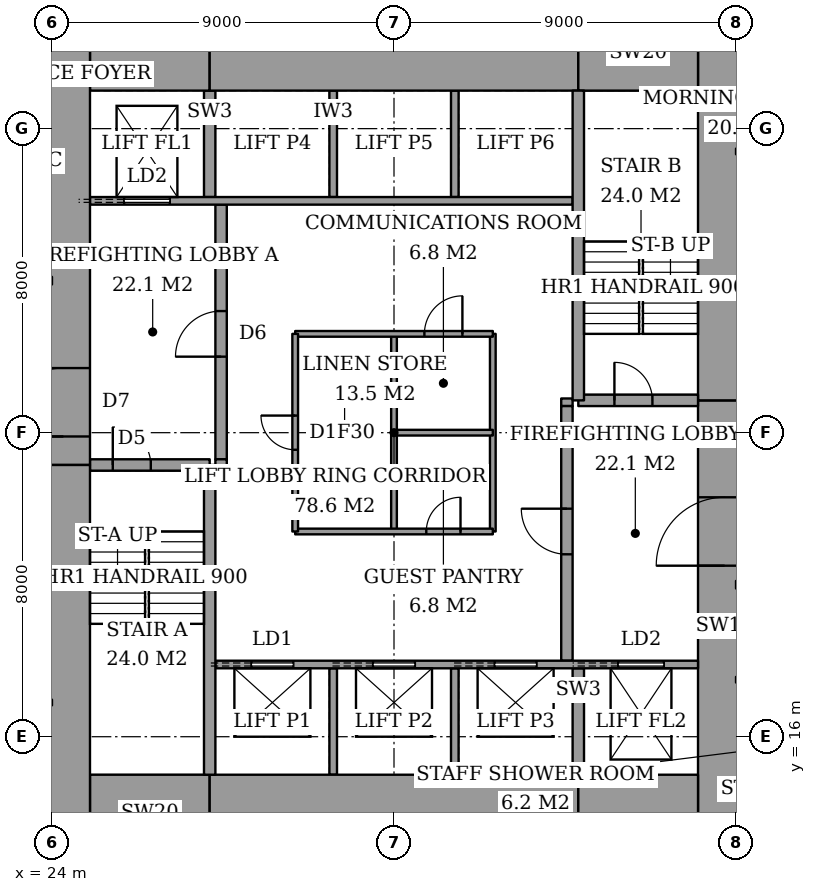
"""IFC4 building model, lengths in metres.
Left out: names, types, materials, properties, quantities, classifications, styles, units other than length and angle.
Written with IfcOpenShell. Run it as: python <this file> out.ifc"""

import sys

from ifc_helpers import new_model, si_unit, direction, frame, frame_2d, origin, place, context, subcontext, project, spatial, rectangle, extrude, element, fill, save


model = new_model("IFC4")
c1 = context("Model", 3, precision=1e-05, world=origin(), true_north=direction((0.0, 1.0)))
c2 = subcontext(c1, "Body", "Model", "MODEL_VIEW")
j1 = project(units=[si_unit("LENGTHUNIT", "METRE"), si_unit("PLANEANGLEUNIT", "RADIAN")], contexts=[c1])
p1 = place(None, origin())
s1 = spatial("IfcSite", under=j1, at=p1, CompositionType="ELEMENT")
p2 = place(p1, origin())
s2 = spatial("IfcBuilding", under=s1, at=p2, CompositionType="ELEMENT")
p3 = place(p2, frame((0.0, 0.0, 161.0)))
s3 = spatial("IfcBuildingStorey", under=s2, at=p3, CompositionType="ELEMENT", Elevation=161.0)
p4 = place(p3, frame((25.0, 14.0, 0.0), z_axis=(0.0, 0.0, 1.0), x_axis=(1.0, 0.0, 0.0)))
e1 = element("IfcWall", 1, at=p4, inside=s3, PredefinedType="SHEAR", context=c2, shape_type="SweptSolid", body=[
    extrude(rectangle(XDim=3.15, YDim=2.0, at=frame_2d((1.575, 0.0))), origin(), (0.0, 0.0, 1.0), 3.6),
])
p5 = place(p3, frame((28.15, 14.0, 0.0), z_axis=(0.0, 0.0, 1.0), x_axis=(1.0, 0.0, 0.0)))
e2 = element("IfcWall", 2, at=p5, inside=s3, PredefinedType="SHEAR", context=c2, shape_type="SweptSolid", body=[
    extrude(rectangle(XDim=9.7, YDim=2.0, at=frame_2d((4.85, 0.0))), origin(), (0.0, 0.0, 1.0), 3.6),
])
for number, where, z_axis, x_axis in (
    (3, (37.85, 14.0, 0.0), (0.0, 0.0, 1.0), (1.0, 0.0, 0.0)),
    (4, (25.0, 34.0, 0.0), (0.0, 0.0, 1.0), (1.0, 0.0, 0.0)),
):
    element("IfcWall", number, at=place(p3, frame(where, z_axis=z_axis, x_axis=x_axis)), inside=s3, PredefinedType="SHEAR", context=c2, shape_type="SweptSolid", body=[
        extrude(rectangle(XDim=3.15, YDim=2.0, at=frame_2d((1.575, 0.0))), origin(), (0.0, 0.0, 1.0), 3.6),
    ])
p6 = place(p3, frame((28.15, 34.0, 0.0), z_axis=(0.0, 0.0, 1.0), x_axis=(1.0, 0.0, 0.0)))
e5 = element("IfcWall", 5, at=p6, inside=s3, PredefinedType="SHEAR", context=c2, shape_type="SweptSolid", body=[
    extrude(rectangle(XDim=9.7, YDim=2.0, at=frame_2d((4.85, 0.0))), origin(), (0.0, 0.0, 1.0), 3.6),
])
p7 = place(p3, frame((37.85, 34.0, 0.0), z_axis=(0.0, 0.0, 1.0), x_axis=(1.0, 0.0, 0.0)))
e6 = element("IfcWall", 6, at=p7, inside=s3, PredefinedType="SHEAR", context=c2, shape_type="SweptSolid", body=[
    extrude(rectangle(XDim=3.15, YDim=2.0, at=frame_2d((1.575, 0.0))), origin(), (0.0, 0.0, 1.0), 3.6),
])
p8 = place(p3, frame((24.3, 13.0, 0.0), z_axis=(0.0, 0.0, 1.0), x_axis=(0.0, 1.0, 0.0)))
e7 = element("IfcWall", 7, at=p8, inside=s3, PredefinedType="SHEAR", context=c2, shape_type="SweptSolid", body=[
    extrude(rectangle(XDim=10.15, YDim=1.4, at=frame_2d((5.075, 0.0))), origin(), (0.0, 0.0, 1.0), 3.6),
])
p9 = place(p3, frame((24.3, 23.15, 0.0), z_axis=(0.0, 0.0, 1.0), x_axis=(0.0, 1.0, 0.0)))
e8 = element("IfcWall", 8, at=p9, inside=s3, PredefinedType="SHEAR", context=c2, shape_type="SweptSolid", body=[
    extrude(rectangle(XDim=11.85, YDim=1.4, at=frame_2d((5.925, 0.0))), origin(), (0.0, 0.0, 1.0), 3.6),
])
p10 = place(p9, frame((0.75, 0.0, 0.0)))
e9 = element("IfcOpeningElement", 9, at=p10, cuts=e8, PredefinedType="OPENING", context=c2, shape_type="SweptSolid", body=[
    extrude(rectangle(XDim=1.8, YDim=2.4, at=frame_2d((0.9, 1.2))), frame((0.0, 0.71, 0.0), z_axis=(0.0, -1.0, 0.0), x_axis=(1.0, 0.0, 0.0)), (0.0, 0.0, 1.0), 1.42),
])
p11 = place(p3, frame((41.7, 13.0, 0.0), z_axis=(0.0, 0.0, 1.0), x_axis=(0.0, 1.0, 0.0)))
e10 = element("IfcWall", 10, at=p11, inside=s3, PredefinedType="SHEAR", context=c2, shape_type="SweptSolid", body=[
    extrude(rectangle(XDim=11.85, YDim=1.4, at=frame_2d((5.925, 0.0))), origin(), (0.0, 0.0, 1.0), 3.6),
])
p12 = place(p11, frame((7.5, 0.0, 0.0)))
e11 = element("IfcOpeningElement", 11, at=p12, cuts=e10, PredefinedType="OPENING", context=c2, shape_type="SweptSolid", body=[
    extrude(rectangle(XDim=1.8, YDim=2.4, at=frame_2d((0.9, 1.2))), frame((0.0, 0.71, 0.0), z_axis=(0.0, -1.0, 0.0), x_axis=(1.0, 0.0, 0.0)), (0.0, 0.0, 1.0), 1.42),
])
p13 = place(p3, frame((41.7, 24.85, 0.0), z_axis=(0.0, 0.0, 1.0), x_axis=(0.0, 1.0, 0.0)))
e12 = element("IfcWall", 12, at=p13, inside=s3, PredefinedType="SHEAR", context=c2, shape_type="SweptSolid", body=[
    extrude(rectangle(XDim=10.15, YDim=1.4, at=frame_2d((5.075, 0.0))), origin(), (0.0, 0.0, 1.0), 3.6),
])
p14 = place(p3, frame((28.15, 15.0, 0.0), z_axis=(0.0, 0.0, 1.0), x_axis=(0.0, 1.0, 0.0)))
e13 = element("IfcWall", 13, at=p14, inside=s3, PredefinedType="SHEAR", context=c2, shape_type="SweptSolid", body=[
    extrude(rectangle(XDim=8.15, YDim=0.3, at=frame_2d((4.075, 0.0))), origin(), (0.0, 0.0, 1.0), 3.6),
])
p15 = place(p3, frame((25.0, 23.15, 0.0), z_axis=(0.0, 0.0, 1.0), x_axis=(1.0, 0.0, 0.0)))
e14 = element("IfcWall", 14, at=p15, inside=s3, PredefinedType="SHEAR", context=c2, shape_type="SweptSolid", body=[
    extrude(rectangle(XDim=3.15, YDim=0.3, at=frame_2d((1.575, 0.0))), origin(), (0.0, 0.0, 1.0), 3.6),
])
p16 = place(p15, frame((0.6, 0.0, 0.0)))
e15 = element("IfcOpeningElement", 15, at=p16, cuts=e14, PredefinedType="OPENING", context=c2, shape_type="SweptSolid", body=[
    extrude(rectangle(XDim=1.0, YDim=2.1, at=frame_2d((0.5, 1.05))), frame((0.0, 0.16, 0.0), z_axis=(0.0, -1.0, 0.0), x_axis=(1.0, 0.0, 0.0)), (0.0, 0.0, 1.0), 0.32),
])
p17 = place(p3, frame((37.85, 24.85, 0.0), z_axis=(0.0, 0.0, 1.0), x_axis=(0.0, 1.0, 0.0)))
e16 = element("IfcWall", 16, at=p17, inside=s3, PredefinedType="SHEAR", context=c2, shape_type="SweptSolid", body=[
    extrude(rectangle(XDim=8.15, YDim=0.3, at=frame_2d((4.075, 0.0))), origin(), (0.0, 0.0, 1.0), 3.6),
])
p18 = place(p3, frame((37.85, 24.85, 0.0), z_axis=(0.0, 0.0, 1.0), x_axis=(1.0, 0.0, 0.0)))
e17 = element("IfcWall", 17, at=p18, inside=s3, PredefinedType="SHEAR", context=c2, shape_type="SweptSolid", body=[
    extrude(rectangle(XDim=3.15, YDim=0.3, at=frame_2d((1.575, 0.0))), origin(), (0.0, 0.0, 1.0), 3.6),
])
p19 = place(p18, frame((0.95, 0.0, 0.0)))
e18 = element("IfcOpeningElement", 18, at=p19, cuts=e17, PredefinedType="OPENING", context=c2, shape_type="SweptSolid", body=[
    extrude(rectangle(XDim=1.0, YDim=2.1, at=frame_2d((0.5, 1.05))), frame((0.0, 0.16, 0.0), z_axis=(0.0, -1.0, 0.0), x_axis=(1.0, 0.0, 0.0)), (0.0, 0.0, 1.0), 0.32),
])
p20 = place(p3, frame((28.45, 23.3, 0.0), z_axis=(0.0, 0.0, 1.0), x_axis=(0.0, 1.0, 0.0)))
e19 = element("IfcWall", 19, at=p20, inside=s3, PredefinedType="PARTITIONING", context=c2, shape_type="SweptSolid", body=[
    extrude(rectangle(XDim=6.7, YDim=0.3, at=frame_2d((3.35, 0.0))), origin(), (0.0, 0.0, 1.0), 3.6),
])
p21 = place(p20, frame((2.7, 0.0, 0.0)))
e20 = element("IfcOpeningElement", 20, at=p21, cuts=e19, PredefinedType="OPENING", context=c2, shape_type="SweptSolid", body=[
    extrude(rectangle(XDim=1.2, YDim=2.1, at=frame_2d((0.6, 1.05))), frame((0.0, 0.16, 0.0), z_axis=(0.0, -1.0, 0.0), x_axis=(1.0, 0.0, 0.0)), (0.0, 0.0, 1.0), 0.32),
])
p22 = place(p3, frame((37.55, 18.0, 0.0), z_axis=(0.0, 0.0, 1.0), x_axis=(0.0, 1.0, 0.0)))
e21 = element("IfcWall", 21, at=p22, inside=s3, PredefinedType="PARTITIONING", context=c2, shape_type="SweptSolid", body=[
    extrude(rectangle(XDim=6.7, YDim=0.3, at=frame_2d((3.35, 0.0))), origin(), (0.0, 0.0, 1.0), 3.6),
])
p23 = place(p22, frame((2.8, 0.0, 0.0)))
e22 = element("IfcOpeningElement", 22, at=p23, cuts=e21, PredefinedType="OPENING", context=c2, shape_type="SweptSolid", body=[
    extrude(rectangle(XDim=1.2, YDim=2.1, at=frame_2d((0.6, 1.05))), frame((0.0, 0.16, 0.0), z_axis=(0.0, -1.0, 0.0), x_axis=(1.0, 0.0, 0.0)), (0.0, 0.0, 1.0), 0.32),
])
p24 = place(p3, frame((28.3, 17.9, 0.0), z_axis=(0.0, 0.0, 1.0), x_axis=(1.0, 0.0, 0.0)))
e23 = element("IfcWall", 23, at=p24, inside=s3, PredefinedType="PARTITIONING", context=c2, shape_type="SweptSolid", body=[
    extrude(rectangle(XDim=12.7, YDim=0.2, at=frame_2d((6.35, 0.0))), origin(), (0.0, 0.0, 1.0), 3.6),
])
p25 = place(p24, frame((0.95, 0.0, 0.0)))
e24 = element("IfcOpeningElement", 24, at=p25, cuts=e23, PredefinedType="OPENING", context=c2, shape_type="SweptSolid", body=[
    extrude(rectangle(XDim=1.1, YDim=2.1, at=frame_2d((0.55, 1.05))), frame((0.0, 0.11, 0.0), z_axis=(0.0, -1.0, 0.0), x_axis=(1.0, 0.0, 0.0)), (0.0, 0.0, 1.0), 0.22),
])
p26 = place(p24, frame((4.15, 0.0, 0.0)))
e25 = element("IfcOpeningElement", 25, at=p26, cuts=e23, PredefinedType="OPENING", context=c2, shape_type="SweptSolid", body=[
    extrude(rectangle(XDim=1.1, YDim=2.1, at=frame_2d((0.55, 1.05))), frame((0.0, 0.11, 0.0), z_axis=(0.0, -1.0, 0.0), x_axis=(1.0, 0.0, 0.0)), (0.0, 0.0, 1.0), 0.22),
])
p27 = place(p24, frame((7.35, 0.0, 0.0)))
e26 = element("IfcOpeningElement", 26, at=p27, cuts=e23, PredefinedType="OPENING", context=c2, shape_type="SweptSolid", body=[
    extrude(rectangle(XDim=1.1, YDim=2.1, at=frame_2d((0.55, 1.05))), frame((0.0, 0.11, 0.0), z_axis=(0.0, -1.0, 0.0), x_axis=(1.0, 0.0, 0.0)), (0.0, 0.0, 1.0), 0.22),
])
p28 = place(p24, frame((10.6, 0.0, 0.0)))
e27 = element("IfcOpeningElement", 27, at=p28, cuts=e23, PredefinedType="OPENING", context=c2, shape_type="SweptSolid", body=[
    extrude(rectangle(XDim=1.2, YDim=2.1, at=frame_2d((0.6, 1.05))), frame((0.0, 0.11, 0.0), z_axis=(0.0, -1.0, 0.0), x_axis=(1.0, 0.0, 0.0)), (0.0, 0.0, 1.0), 0.22),
])
p29 = place(p3, frame((25.0, 30.1, 0.0), z_axis=(0.0, 0.0, 1.0), x_axis=(1.0, 0.0, 0.0)))
e28 = element("IfcWall", 28, at=p29, inside=s3, PredefinedType="PARTITIONING", context=c2, shape_type="SweptSolid", body=[
    extrude(rectangle(XDim=12.7, YDim=0.2, at=frame_2d((6.35, 0.0))), origin(), (0.0, 0.0, 1.0), 3.6),
])
p30 = place(p29, frame((0.9, 0.0, 0.0)))
e29 = element("IfcOpeningElement", 29, at=p30, cuts=e28, PredefinedType="OPENING", context=c2, shape_type="SweptSolid", body=[
    extrude(rectangle(XDim=1.2, YDim=2.1, at=frame_2d((0.6, 1.05))), frame((0.0, 0.11, 0.0), z_axis=(0.0, -1.0, 0.0), x_axis=(1.0, 0.0, 0.0)), (0.0, 0.0, 1.0), 0.22),
])
for number, where, z_axis, x_axis in (
    (30, (31.4, 15.0, 0.0), (0.0, 0.0, 1.0), (0.0, 1.0, 0.0)),
    (31, (34.6, 15.0, 0.0), (0.0, 0.0, 1.0), (0.0, 1.0, 0.0)),
):
    element("IfcWall", number, at=place(p3, frame(where, z_axis=z_axis, x_axis=x_axis)), inside=s3, PredefinedType="PARTITIONING", context=c2, shape_type="SweptSolid", body=[
        extrude(rectangle(XDim=2.8, YDim=0.2, at=frame_2d((1.4, 0.0))), origin(), (0.0, 0.0, 1.0), 3.6),
    ])
p31 = place(p3, frame((37.85, 15.0, 0.0), z_axis=(0.0, 0.0, 1.0), x_axis=(0.0, 1.0, 0.0)))
e32 = element("IfcWall", 32, at=p31, inside=s3, PredefinedType="SHEAR", context=c2, shape_type="SweptSolid", body=[
    extrude(rectangle(XDim=2.8, YDim=0.3, at=frame_2d((1.4, 0.0))), origin(), (0.0, 0.0, 1.0), 3.6),
])
for number, where, z_axis, x_axis in (
    (33, (31.4, 30.2, 0.0), (0.0, 0.0, 1.0), (0.0, 1.0, 0.0)),
    (34, (34.6, 30.2, 0.0), (0.0, 0.0, 1.0), (0.0, 1.0, 0.0)),
):
    element("IfcWall", number, at=place(p3, frame(where, z_axis=z_axis, x_axis=x_axis)), inside=s3, PredefinedType="PARTITIONING", context=c2, shape_type="SweptSolid", body=[
        extrude(rectangle(XDim=2.8, YDim=0.2, at=frame_2d((1.4, 0.0))), origin(), (0.0, 0.0, 1.0), 3.6),
    ])
p32 = place(p3, frame((28.15, 30.2, 0.0), z_axis=(0.0, 0.0, 1.0), x_axis=(0.0, 1.0, 0.0)))
e35 = element("IfcWall", 35, at=p32, inside=s3, PredefinedType="SHEAR", context=c2, shape_type="SweptSolid", body=[
    extrude(rectangle(XDim=2.8, YDim=0.3, at=frame_2d((1.4, 0.0))), origin(), (0.0, 0.0, 1.0), 3.6),
])
for number, where, z_axis, x_axis in (
    (36, (28.3, 23.2, 0.0), (0.0, 0.0, 1.0), (1.0, 0.0, 0.0)),
    (37, (37.4, 24.8, 0.0), (0.0, 0.0, 1.0), (1.0, 0.0, 0.0)),
):
    element("IfcWall", number, at=place(p3, frame(where, z_axis=z_axis, x_axis=x_axis)), inside=s3, PredefinedType="PARTITIONING", context=c2, shape_type="SweptSolid", body=[
        extrude(rectangle(XDim=0.3, YDim=0.2, at=frame_2d((0.15, 0.0))), origin(), (0.0, 0.0, 1.0), 3.6),
    ])
p33 = place(p3, frame((30.4, 21.4, 0.0), z_axis=(0.0, 0.0, 1.0), x_axis=(1.0, 0.0, 0.0)))
e38 = element("IfcWall", 38, at=p33, inside=s3, PredefinedType="PARTITIONING", context=c2, shape_type="SweptSolid", body=[
    extrude(rectangle(XDim=5.2, YDim=0.15, at=frame_2d((2.6, 0.0))), origin(), (0.0, 0.0, 1.0), 3.35),
])
p34 = place(p33, frame((3.45, 0.0, 0.0)))
e39 = element("IfcOpeningElement", 39, at=p34, cuts=e38, PredefinedType="OPENING", context=c2, shape_type="SweptSolid", body=[
    extrude(rectangle(XDim=0.9, YDim=2.1, at=frame_2d((0.45, 1.05))), frame((0.0, 0.085, 0.0), z_axis=(0.0, -1.0, 0.0), x_axis=(1.0, 0.0, 0.0)), (0.0, 0.0, 1.0), 0.17),
])
p35 = place(p3, frame((30.4, 26.6, 0.0), z_axis=(0.0, 0.0, 1.0), x_axis=(1.0, 0.0, 0.0)))
e40 = element("IfcWall", 40, at=p35, inside=s3, PredefinedType="PARTITIONING", context=c2, shape_type="SweptSolid", body=[
    extrude(rectangle(XDim=5.2, YDim=0.15, at=frame_2d((2.6, 0.0))), origin(), (0.0, 0.0, 1.0), 3.35),
])
p36 = place(p35, frame((3.4, 0.0, 0.0)))
e41 = element("IfcOpeningElement", 41, at=p36, cuts=e40, PredefinedType="OPENING", context=c2, shape_type="SweptSolid", body=[
    extrude(rectangle(XDim=1.0, YDim=2.1, at=frame_2d((0.5, 1.05))), frame((0.0, 0.085, 0.0), z_axis=(0.0, -1.0, 0.0), x_axis=(1.0, 0.0, 0.0)), (0.0, 0.0, 1.0), 0.17),
])
p37 = place(p3, frame((30.4, 21.4, 0.0), z_axis=(0.0, 0.0, 1.0), x_axis=(0.0, 1.0, 0.0)))
e42 = element("IfcWall", 42, at=p37, inside=s3, PredefinedType="PARTITIONING", context=c2, shape_type="SweptSolid", body=[
    extrude(rectangle(XDim=5.2, YDim=0.15, at=frame_2d((2.6, 0.0))), origin(), (0.0, 0.0, 1.0), 3.35),
])
p38 = place(p37, frame((2.15, 0.0, 0.0)))
e43 = element("IfcOpeningElement", 43, at=p38, cuts=e42, PredefinedType="OPENING", context=c2, shape_type="SweptSolid", body=[
    extrude(rectangle(XDim=0.9, YDim=2.1, at=frame_2d((0.45, 1.05))), frame((0.0, 0.085, 0.0), z_axis=(0.0, -1.0, 0.0), x_axis=(1.0, 0.0, 0.0)), (0.0, 0.0, 1.0), 0.17),
])
p39 = place(p3, frame((35.6, 21.4, 0.0), z_axis=(0.0, 0.0, 1.0), x_axis=(0.0, 1.0, 0.0)))
e44 = element("IfcWall", 44, at=p39, inside=s3, PredefinedType="PARTITIONING", context=c2, shape_type="SweptSolid", body=[
    extrude(rectangle(XDim=5.2, YDim=0.15, at=frame_2d((2.6, 0.0))), origin(), (0.0, 0.0, 1.0), 3.35),
])
p40 = place(p3, frame((33.0, 24.0, 0.0), z_axis=(0.0, 0.0, 1.0), x_axis=(1.0, 0.0, 0.0)))
e45 = element("IfcWall", 45, at=p40, inside=s3, PredefinedType="PARTITIONING", context=c2, shape_type="SweptSolid", body=[
    extrude(rectangle(XDim=2.6, YDim=0.15, at=frame_2d((1.3, 0.0))), origin(), (0.0, 0.0, 1.0), 3.35),
])
p41 = place(p3, frame((33.0, 21.4, 0.0), z_axis=(0.0, 0.0, 1.0), x_axis=(0.0, 1.0, 0.0)))
e46 = element("IfcWall", 46, at=p41, inside=s3, PredefinedType="PARTITIONING", context=c2, shape_type="SweptSolid", body=[
    extrude(rectangle(XDim=5.2, YDim=0.15, at=frame_2d((2.6, 0.0))), origin(), (0.0, 0.0, 1.0), 3.35),
])
p42 = place(p16, origin())
e47 = element("IfcDoor", 47, at=p42, inside=s3, OperationType="SINGLE_SWING_RIGHT", PredefinedType="DOOR", context=c2, shape_type="SweptSolid", body=[
    extrude(rectangle(XDim=1.0, YDim=2.1, at=frame_2d((0.5, 1.05))), frame((0.0, 0.025, 0.0), z_axis=(0.0, -1.0, 0.0), x_axis=(1.0, 0.0, 0.0)), (0.0, 0.0, 1.0), 0.05),
])
fill(e15, e47)
p43 = place(p19, origin())
e48 = element("IfcDoor", 48, at=p43, inside=s3, OperationType="SINGLE_SWING_RIGHT", PredefinedType="DOOR", context=c2, shape_type="SweptSolid", body=[
    extrude(rectangle(XDim=1.0, YDim=2.1, at=frame_2d((0.5, 1.05))), frame((0.0, 0.025, 0.0), z_axis=(0.0, -1.0, 0.0), x_axis=(1.0, 0.0, 0.0)), (0.0, 0.0, 1.0), 0.05),
])
fill(e18, e48)
p44 = place(p21, origin())
e49 = element("IfcDoor", 49, at=p44, inside=s3, OperationType="SINGLE_SWING_RIGHT", PredefinedType="DOOR", context=c2, shape_type="SweptSolid", body=[
    extrude(rectangle(XDim=1.2, YDim=2.1, at=frame_2d((0.6, 1.05))), frame((0.0, 0.025, 0.0), z_axis=(0.0, -1.0, 0.0), x_axis=(1.0, 0.0, 0.0)), (0.0, 0.0, 1.0), 0.05),
])
fill(e20, e49)
p45 = place(p23, origin())
e50 = element("IfcDoor", 50, at=p45, inside=s3, OperationType="SINGLE_SWING_LEFT", PredefinedType="DOOR", context=c2, shape_type="SweptSolid", body=[
    extrude(rectangle(XDim=1.2, YDim=2.1, at=frame_2d((0.6, 1.05))), frame((0.0, 0.025, 0.0), z_axis=(0.0, -1.0, 0.0), x_axis=(1.0, 0.0, 0.0)), (0.0, 0.0, 1.0), 0.05),
])
fill(e22, e50)
p46 = place(p10, origin())
e51 = element("IfcDoor", 51, at=p46, inside=s3, OperationType="DOUBLE_DOOR_DOUBLE_SWING", PredefinedType="DOOR", context=c2, shape_type="SweptSolid", body=[
    extrude(rectangle(XDim=1.8, YDim=2.4, at=frame_2d((0.9, 1.2))), frame((0.0, 0.025, 0.0), z_axis=(0.0, -1.0, 0.0), x_axis=(1.0, 0.0, 0.0)), (0.0, 0.0, 1.0), 0.05),
])
fill(e9, e51)
p47 = place(p12, origin())
e52 = element("IfcDoor", 52, at=p47, inside=s3, OperationType="DOUBLE_DOOR_DOUBLE_SWING", PredefinedType="DOOR", context=c2, shape_type="SweptSolid", body=[
    extrude(rectangle(XDim=1.8, YDim=2.4, at=frame_2d((0.9, 1.2))), frame((0.0, 0.025, 0.0), z_axis=(0.0, -1.0, 0.0), x_axis=(1.0, 0.0, 0.0)), (0.0, 0.0, 1.0), 0.05),
])
fill(e11, e52)
p48 = place(p38, origin())
e53 = element("IfcDoor", 53, at=p48, inside=s3, OperationType="SINGLE_SWING_LEFT", PredefinedType="DOOR", context=c2, shape_type="SweptSolid", body=[
    extrude(rectangle(XDim=0.9, YDim=2.1, at=frame_2d((0.45, 1.05))), frame((0.0, 0.025, 0.0), z_axis=(0.0, -1.0, 0.0), x_axis=(1.0, 0.0, 0.0)), (0.0, 0.0, 1.0), 0.05),
])
fill(e43, e53)
p49 = place(p34, origin())
e54 = element("IfcDoor", 54, at=p49, inside=s3, OperationType="SINGLE_SWING_LEFT", PredefinedType="DOOR", context=c2, shape_type="SweptSolid", body=[
    extrude(rectangle(XDim=0.9, YDim=2.1, at=frame_2d((0.45, 1.05))), frame((0.0, 0.025, 0.0), z_axis=(0.0, -1.0, 0.0), x_axis=(1.0, 0.0, 0.0)), (0.0, 0.0, 1.0), 0.05),
])
fill(e39, e54)
p50 = place(p36, origin())
e55 = element("IfcDoor", 55, at=p50, inside=s3, OperationType="SINGLE_SWING_LEFT", PredefinedType="DOOR", context=c2, shape_type="SweptSolid", body=[
    extrude(rectangle(XDim=1.0, YDim=2.1, at=frame_2d((0.5, 1.05))), frame((0.0, 0.025, 0.0), z_axis=(0.0, -1.0, 0.0), x_axis=(1.0, 0.0, 0.0)), (0.0, 0.0, 1.0), 0.05),
])
fill(e41, e55)
p51 = place(p25, origin())
e56 = element("IfcDoor", 56, at=p51, inside=s3, OperationType="SLIDING_TO_LEFT", PredefinedType="DOOR", context=c2, shape_type="SweptSolid", body=[
    extrude(rectangle(XDim=1.1, YDim=2.1, at=frame_2d((0.55, 1.05))), frame((0.0, 0.025, 0.0), z_axis=(0.0, -1.0, 0.0), x_axis=(1.0, 0.0, 0.0)), (0.0, 0.0, 1.0), 0.05),
])
fill(e24, e56)
p52 = place(p26, origin())
e57 = element("IfcDoor", 57, at=p52, inside=s3, OperationType="SLIDING_TO_LEFT", PredefinedType="DOOR", context=c2, shape_type="SweptSolid", body=[
    extrude(rectangle(XDim=1.1, YDim=2.1, at=frame_2d((0.55, 1.05))), frame((0.0, 0.025, 0.0), z_axis=(0.0, -1.0, 0.0), x_axis=(1.0, 0.0, 0.0)), (0.0, 0.0, 1.0), 0.05),
])
fill(e25, e57)
p53 = place(p27, origin())
e58 = element("IfcDoor", 58, at=p53, inside=s3, OperationType="SLIDING_TO_LEFT", PredefinedType="DOOR", context=c2, shape_type="SweptSolid", body=[
    extrude(rectangle(XDim=1.1, YDim=2.1, at=frame_2d((0.55, 1.05))), frame((0.0, 0.025, 0.0), z_axis=(0.0, -1.0, 0.0), x_axis=(1.0, 0.0, 0.0)), (0.0, 0.0, 1.0), 0.05),
])
fill(e26, e58)
p54 = place(p30, origin())
e59 = element("IfcDoor", 59, at=p54, inside=s3, OperationType="SLIDING_TO_LEFT", PredefinedType="DOOR", context=c2, shape_type="SweptSolid", body=[
    extrude(rectangle(XDim=1.2, YDim=2.1, at=frame_2d((0.6, 1.05))), frame((0.0, 0.025, 0.0), z_axis=(0.0, -1.0, 0.0), x_axis=(1.0, 0.0, 0.0)), (0.0, 0.0, 1.0), 0.05),
])
fill(e29, e59)
p55 = place(p28, origin())
e60 = element("IfcDoor", 60, at=p55, inside=s3, OperationType="SLIDING_TO_LEFT", PredefinedType="DOOR", context=c2, shape_type="SweptSolid", body=[
    extrude(rectangle(XDim=1.2, YDim=2.1, at=frame_2d((0.6, 1.05))), frame((0.0, 0.025, 0.0), z_axis=(0.0, -1.0, 0.0), x_axis=(1.0, 0.0, 0.0)), (0.0, 0.0, 1.0), 0.05),
])
fill(e27, e60)
save(model, sys.argv[1])
